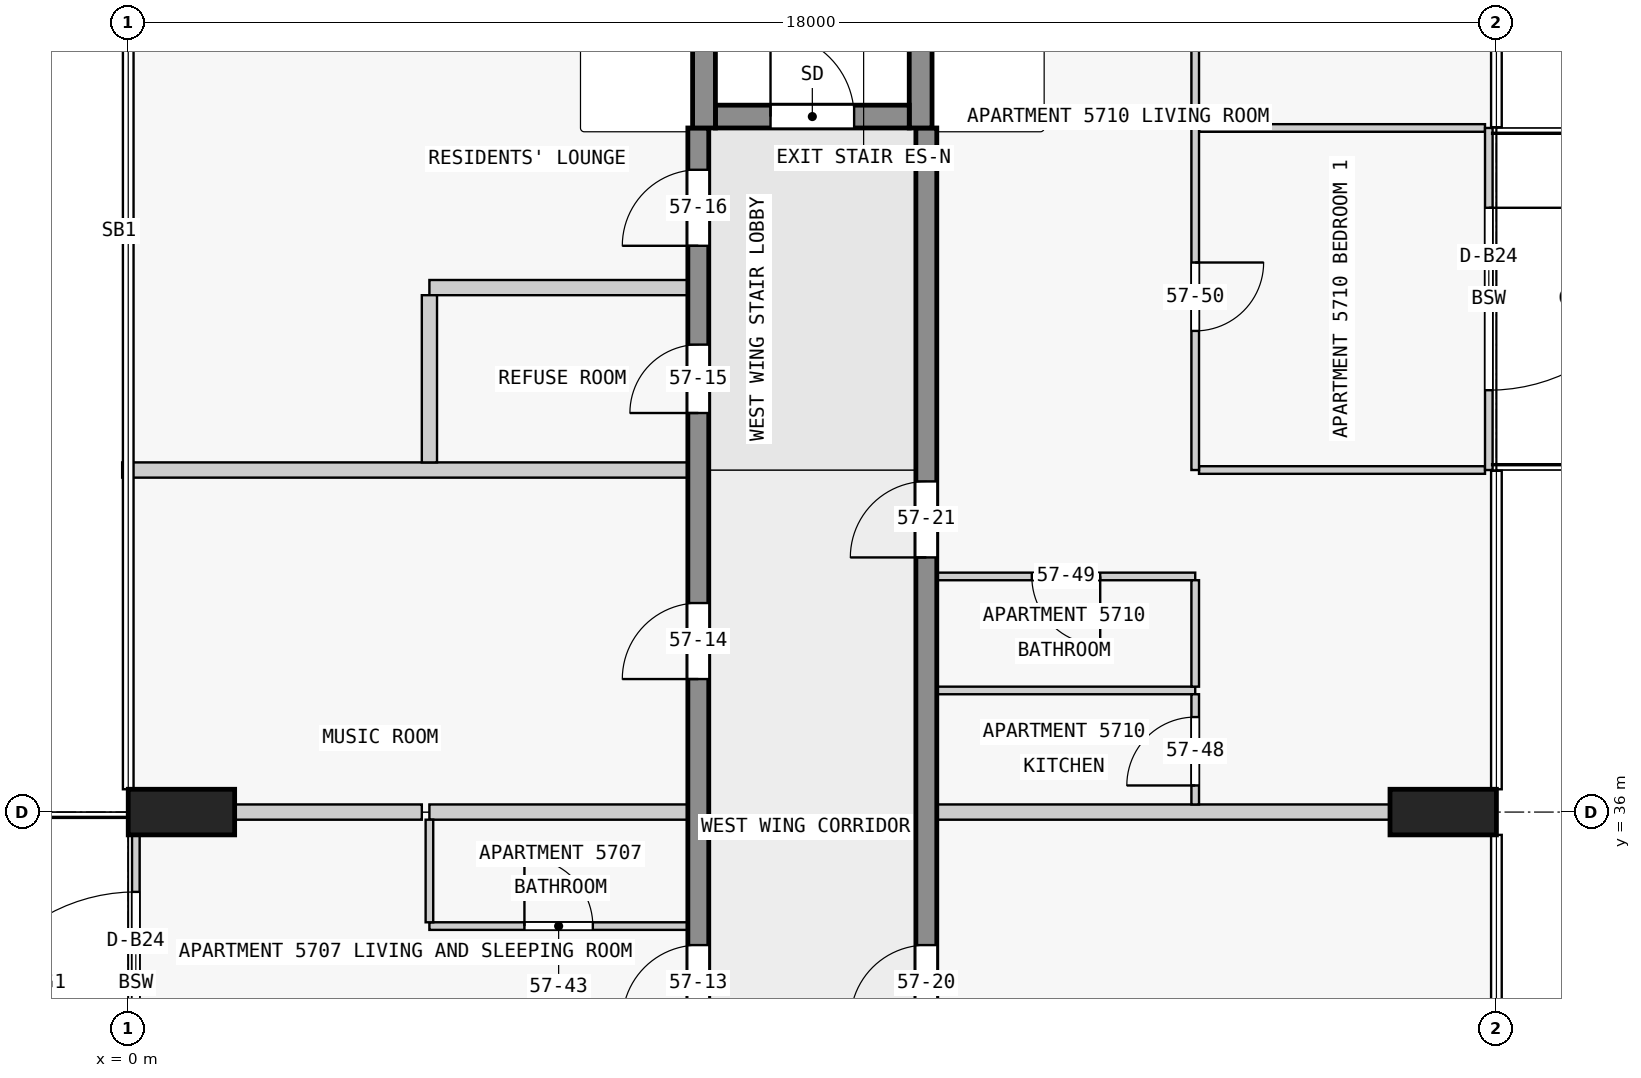
"""IFC4 building model, lengths in metres.
Left out: names, types, materials, properties, quantities, classifications, styles, units other than length and angle.
Written with IfcOpenShell. Run it as: python <this file> out.ifc"""

import sys

from ifc_helpers import new_model, si_unit, direction, frame, frame_2d, origin, origin_2d, place, context, subcontext, project, spatial, rectangle, extrude, element, fill, save


model = new_model("IFC4")
c1 = context("Model", 3, precision=1e-05, world=origin(), true_north=direction((0.0, 1.0)))
c2 = subcontext(c1, "Body", "Model", "MODEL_VIEW")
j1 = project(units=[si_unit("LENGTHUNIT", "METRE"), si_unit("PLANEANGLEUNIT", "RADIAN")], contexts=[c1])
p1 = place(None, origin())
s1 = spatial("IfcSite", under=j1, at=p1, CompositionType="ELEMENT")
p2 = place(p1, origin())
s2 = spatial("IfcBuilding", under=s1, at=p2, CompositionType="ELEMENT")
p3 = place(p2, frame((0.0, 0.0, 218.9)))
s3 = spatial("IfcBuildingStorey", under=s2, at=p3, CompositionType="ELEMENT", Elevation=218.9)
for number, where, z_axis, x_axis in (
    (1, (17.3, 36.0, 0.0), (0.0, 0.0, 1.0), (0.0, 1.0, 0.0)),
    (2, (0.7, 36.0, 0.0), (0.0, 0.0, 1.0), (0.0, 1.0, 0.0)),
):
    element("IfcColumn", number, at=place(p3, frame(where, z_axis=z_axis, x_axis=x_axis)), inside=s3, PredefinedType="COLUMN", context=c2, shape_type="SweptSolid", body=[
        extrude(rectangle(XDim=0.6, YDim=1.4, at=origin_2d()), origin(), (0.0, 0.0, 1.0), 3.5),
    ])
p4 = place(p3, frame((7.725, 45.15, 0.0), z_axis=(0.0, 0.0, 1.0), x_axis=(1.0, 0.0, 0.0)))
e3 = element("IfcWall", 3, at=p4, inside=s3, PredefinedType="SHEAR", context=c2, shape_type="SweptSolid", body=[
    extrude(rectangle(XDim=2.55, YDim=0.3, at=frame_2d((1.275, 0.0))), origin(), (0.0, 0.0, 1.0), 3.5),
])
p5 = place(p4, frame((0.725, 0.0, 0.0)))
e4 = element("IfcOpeningElement", 4, at=p5, cuts=e3, PredefinedType="OPENING", context=c2, shape_type="SweptSolid", body=[
    extrude(rectangle(XDim=1.1, YDim=2.1, at=frame_2d((0.55, 1.05))), frame((0.0, 0.16, 0.0), z_axis=(0.0, -1.0, 0.0), x_axis=(1.0, 0.0, 0.0)), (0.0, 0.0, 1.0), 0.32),
])
for number, where, z_axis, x_axis in (
    (5, (7.575, 45.0, 0.0), (0.0, 0.0, 1.0), (0.0, 1.0, 0.0)),
    (6, (10.425, 45.0, 0.0), (0.0, 0.0, 1.0), (0.0, 1.0, 0.0)),
):
    element("IfcWall", number, at=place(p3, frame(where, z_axis=z_axis, x_axis=x_axis)), inside=s3, PredefinedType="SHEAR", context=c2, shape_type="SweptSolid", body=[
        extrude(rectangle(XDim=7.2, YDim=0.3, at=frame_2d((3.6, 0.0))), origin(), (0.0, 0.0, 1.0), 3.5),
    ])
p6 = place(p3, frame((7.5, 18.0, 0.0), z_axis=(0.0, 0.0, 1.0), x_axis=(0.0, 1.0, 0.0)))
e7 = element("IfcWall", 7, at=p6, inside=s3, PredefinedType="SHEAR", context=c2, shape_type="SweptSolid", body=[
    extrude(rectangle(XDim=27.0, YDim=0.275, at=frame_2d((13.5, 0.0))), origin(), (0.0, 0.0, 1.0), 3.25),
])
p7 = place(p6, frame((1.75, 0.0, 0.0)))
e8 = element("IfcOpeningElement", 8, at=p7, cuts=e7, PredefinedType="OPENING", context=c2, shape_type="SweptSolid", body=[
    extrude(rectangle(XDim=1.0, YDim=2.1, at=frame_2d((0.5, 1.05))), frame((0.0, 0.147, 0.0), z_axis=(0.0, -1.0, 0.0), x_axis=(1.0, 0.0, 0.0)), (0.0, 0.0, 1.0), 0.295),
])
p8 = place(p6, frame((6.25, 0.0, 0.0)))
e9 = element("IfcOpeningElement", 9, at=p8, cuts=e7, PredefinedType="OPENING", context=c2, shape_type="SweptSolid", body=[
    extrude(rectangle(XDim=1.0, YDim=2.1, at=frame_2d((0.5, 1.05))), frame((0.0, 0.147, 0.0), z_axis=(0.0, -1.0, 0.0), x_axis=(1.0, 0.0, 0.0)), (0.0, 0.0, 1.0), 0.295),
])
p9 = place(p6, frame((10.35, 0.0, 0.0)))
e10 = element("IfcOpeningElement", 10, at=p9, cuts=e7, PredefinedType="OPENING", context=c2, shape_type="SweptSolid", body=[
    extrude(rectangle(XDim=1.8, YDim=2.1, at=frame_2d((0.9, 1.05))), frame((0.0, 0.147, 0.0), z_axis=(0.0, -1.0, 0.0), x_axis=(1.0, 0.0, 0.0)), (0.0, 0.0, 1.0), 0.295),
])
p10 = place(p6, frame((15.25, 0.0, 0.0)))
e11 = element("IfcOpeningElement", 11, at=p10, cuts=e7, PredefinedType="OPENING", context=c2, shape_type="SweptSolid", body=[
    extrude(rectangle(XDim=1.0, YDim=2.1, at=frame_2d((0.5, 1.05))), frame((0.0, 0.147, 0.0), z_axis=(0.0, -1.0, 0.0), x_axis=(1.0, 0.0, 0.0)), (0.0, 0.0, 1.0), 0.295),
])
p11 = place(p6, frame((19.75, 0.0, 0.0)))
e12 = element("IfcOpeningElement", 12, at=p11, cuts=e7, PredefinedType="OPENING", context=c2, shape_type="SweptSolid", body=[
    extrude(rectangle(XDim=1.0, YDim=2.1, at=frame_2d((0.5, 1.05))), frame((0.0, 0.147, 0.0), z_axis=(0.0, -1.0, 0.0), x_axis=(1.0, 0.0, 0.0)), (0.0, 0.0, 1.0), 0.295),
])
p12 = place(p6, frame((23.25, 0.0, 0.0)))
e13 = element("IfcOpeningElement", 13, at=p12, cuts=e7, PredefinedType="OPENING", context=c2, shape_type="SweptSolid", body=[
    extrude(rectangle(XDim=0.9, YDim=2.1, at=frame_2d((0.45, 1.05))), frame((0.0, 0.147, 0.0), z_axis=(0.0, -1.0, 0.0), x_axis=(1.0, 0.0, 0.0)), (0.0, 0.0, 1.0), 0.295),
])
p13 = place(p6, frame((25.45, 0.0, 0.0)))
e14 = element("IfcOpeningElement", 14, at=p13, cuts=e7, PredefinedType="OPENING", context=c2, shape_type="SweptSolid", body=[
    extrude(rectangle(XDim=1.0, YDim=2.1, at=frame_2d((0.5, 1.05))), frame((0.0, 0.147, 0.0), z_axis=(0.0, -1.0, 0.0), x_axis=(1.0, 0.0, 0.0)), (0.0, 0.0, 1.0), 0.295),
])
p14 = place(p3, frame((10.5, 18.0, 0.0), z_axis=(0.0, 0.0, 1.0), x_axis=(0.0, 1.0, 0.0)))
e15 = element("IfcWall", 15, at=p14, inside=s3, PredefinedType="SHEAR", context=c2, shape_type="SweptSolid", body=[
    extrude(rectangle(XDim=27.0, YDim=0.275, at=frame_2d((13.5, 0.0))), origin(), (0.0, 0.0, 1.0), 3.25),
])
p15 = place(p14, frame((1.75, 0.0, 0.0)))
e16 = element("IfcOpeningElement", 16, at=p15, cuts=e15, PredefinedType="OPENING", context=c2, shape_type="SweptSolid", body=[
    extrude(rectangle(XDim=1.0, YDim=2.1, at=frame_2d((0.5, 1.05))), frame((0.0, 0.147, 0.0), z_axis=(0.0, -1.0, 0.0), x_axis=(1.0, 0.0, 0.0)), (0.0, 0.0, 1.0), 0.295),
])
p16 = place(p14, frame((6.25, 0.0, 0.0)))
e17 = element("IfcOpeningElement", 17, at=p16, cuts=e15, PredefinedType="OPENING", context=c2, shape_type="SweptSolid", body=[
    extrude(rectangle(XDim=1.0, YDim=2.1, at=frame_2d((0.5, 1.05))), frame((0.0, 0.147, 0.0), z_axis=(0.0, -1.0, 0.0), x_axis=(1.0, 0.0, 0.0)), (0.0, 0.0, 1.0), 0.295),
])
p17 = place(p14, frame((10.75, 0.0, 0.0)))
e18 = element("IfcOpeningElement", 18, at=p17, cuts=e15, PredefinedType="OPENING", context=c2, shape_type="SweptSolid", body=[
    extrude(rectangle(XDim=1.0, YDim=2.1, at=frame_2d((0.5, 1.05))), frame((0.0, 0.147, 0.0), z_axis=(0.0, -1.0, 0.0), x_axis=(1.0, 0.0, 0.0)), (0.0, 0.0, 1.0), 0.295),
])
p18 = place(p14, frame((15.25, 0.0, 0.0)))
e19 = element("IfcOpeningElement", 19, at=p18, cuts=e15, PredefinedType="OPENING", context=c2, shape_type="SweptSolid", body=[
    extrude(rectangle(XDim=1.0, YDim=2.1, at=frame_2d((0.5, 1.05))), frame((0.0, 0.147, 0.0), z_axis=(0.0, -1.0, 0.0), x_axis=(1.0, 0.0, 0.0)), (0.0, 0.0, 1.0), 0.295),
])
p19 = place(p14, frame((21.35, 0.0, 0.0)))
e20 = element("IfcOpeningElement", 20, at=p19, cuts=e15, PredefinedType="OPENING", context=c2, shape_type="SweptSolid", body=[
    extrude(rectangle(XDim=1.0, YDim=2.1, at=frame_2d((0.5, 1.05))), frame((0.0, 0.147, 0.0), z_axis=(0.0, -1.0, 0.0), x_axis=(1.0, 0.0, 0.0)), (0.0, 0.0, 1.0), 0.295),
])
p20 = place(p3, frame((0.1, 31.5, 0.0), z_axis=(0.0, 0.0, 1.0), x_axis=(0.0, 1.0, 0.0)))
e21 = element("IfcWall", 21, at=p20, inside=s3, PredefinedType="STANDARD", context=c2, shape_type="SweptSolid", body=[
    extrude(rectangle(XDim=4.5, YDim=0.1, at=frame_2d((2.25, 0.0))), origin(), (0.0, 0.0, 1.0), 3.25),
])
p21 = place(p20, frame((1.05, 0.0, 0.0)))
e22 = element("IfcOpeningElement", 22, at=p21, cuts=e21, PredefinedType="OPENING", context=c2, shape_type="SweptSolid", body=[
    extrude(rectangle(XDim=2.4, YDim=2.4, at=frame_2d((1.2, 1.2))), frame((0.0, 0.06, 0.0), z_axis=(0.0, -1.0, 0.0), x_axis=(1.0, 0.0, 0.0)), (0.0, 0.0, 1.0), 0.12),
])
p22 = place(p3, frame((17.9, 45.0, 0.0), z_axis=(0.0, 0.0, 1.0), x_axis=(0.0, -1.0, 0.0)))
e23 = element("IfcWall", 23, at=p22, inside=s3, PredefinedType="STANDARD", context=c2, shape_type="SweptSolid", body=[
    extrude(rectangle(XDim=4.5, YDim=0.1, at=frame_2d((2.25, 0.0))), origin(), (0.0, 0.0, 1.0), 3.25),
])
p23 = place(p22, frame((1.05, 0.0, 0.0)))
e24 = element("IfcOpeningElement", 24, at=p23, cuts=e23, PredefinedType="OPENING", context=c2, shape_type="SweptSolid", body=[
    extrude(rectangle(XDim=2.4, YDim=2.4, at=frame_2d((1.2, 1.2))), frame((0.0, 0.06, 0.0), z_axis=(0.0, -1.0, 0.0), x_axis=(1.0, 0.0, 0.0)), (0.0, 0.0, 1.0), 0.12),
])
p24 = place(p3, frame((3.962, 34.5, 0.0), z_axis=(0.0, 0.0, 1.0), x_axis=(1.0, 0.0, 0.0)))
e25 = element("IfcWall", 25, at=p24, inside=s3, PredefinedType="PARTITIONING", context=c2, shape_type="SweptSolid", body=[
    extrude(rectangle(XDim=3.4, YDim=0.1, at=frame_2d((1.7, 0.0))), origin(), (0.0, 0.0, 1.0), 3.25),
])
p25 = place(p24, frame((1.25, 0.0, 0.0)))
e26 = element("IfcOpeningElement", 26, at=p25, cuts=e25, PredefinedType="OPENING", context=c2, shape_type="SweptSolid", body=[
    extrude(rectangle(XDim=0.9, YDim=2.1, at=frame_2d((0.45, 1.05))), frame((0.0, 0.06, 0.0), z_axis=(0.0, -1.0, 0.0), x_axis=(1.0, 0.0, 0.0)), (0.0, 0.0, 1.0), 0.12),
])
p26 = place(p3, frame((7.363, 36.0, 0.0), z_axis=(0.0, 0.0, 1.0), x_axis=(-1.0, 0.0, 0.0)))
e27 = element("IfcWall", 27, at=p26, inside=s3, PredefinedType="PARTITIONING", context=c2, shape_type="SweptSolid", body=[
    extrude(rectangle(XDim=3.4, YDim=0.2, at=frame_2d((1.7, 0.0))), origin(), (0.0, 0.0, 1.0), 3.25),
])
p27 = place(p3, frame((16.6, 36.0, 0.0), z_axis=(0.0, 0.0, 1.0), x_axis=(-1.0, 0.0, 0.0)))
e28 = element("IfcWall", 28, at=p27, inside=s3, PredefinedType="PARTITIONING", context=c2, shape_type="SweptSolid", body=[
    extrude(rectangle(XDim=5.963, YDim=0.2, at=frame_2d((2.981, 0.0))), origin(), (0.0, 0.0, 1.0), 3.25),
])
p28 = place(p3, frame((1.4, 36.0, 0.0), z_axis=(0.0, 0.0, 1.0), x_axis=(1.0, 0.0, 0.0)))
e29 = element("IfcWall", 29, at=p28, inside=s3, PredefinedType="PARTITIONING", context=c2, shape_type="SweptSolid", body=[
    extrude(rectangle(XDim=2.463, YDim=0.2, at=frame_2d((1.231, 0.0))), origin(), (0.0, 0.0, 1.0), 3.25),
])
p29 = place(p3, frame((14.038, 37.6, 0.0), z_axis=(0.0, 0.0, 1.0), x_axis=(-1.0, 0.0, 0.0)))
e30 = element("IfcWall", 30, at=p29, inside=s3, PredefinedType="PARTITIONING", context=c2, shape_type="SweptSolid", body=[
    extrude(rectangle(XDim=3.4, YDim=0.1, at=frame_2d((1.7, 0.0))), origin(), (0.0, 0.0, 1.0), 3.25),
])
p30 = place(p3, frame((14.038, 39.1, 0.0), z_axis=(0.0, 0.0, 1.0), x_axis=(-1.0, 0.0, 0.0)))
e31 = element("IfcWall", 31, at=p30, inside=s3, PredefinedType="PARTITIONING", context=c2, shape_type="SweptSolid", body=[
    extrude(rectangle(XDim=3.4, YDim=0.1, at=frame_2d((1.7, 0.0))), origin(), (0.0, 0.0, 1.0), 3.25),
])
p31 = place(p30, frame((1.25, 0.0, 0.0)))
e32 = element("IfcOpeningElement", 32, at=p31, cuts=e31, PredefinedType="OPENING", context=c2, shape_type="SweptSolid", body=[
    extrude(rectangle(XDim=0.9, YDim=2.1, at=frame_2d((0.45, 1.05))), frame((0.0, 0.06, 0.0), z_axis=(0.0, -1.0, 0.0), x_axis=(1.0, 0.0, 0.0)), (0.0, 0.0, 1.0), 0.12),
])
p32 = place(p3, frame((14.087, 40.5, 0.0), z_axis=(0.0, 0.0, 1.0), x_axis=(1.0, 0.0, 0.0)))
e33 = element("IfcWall", 33, at=p32, inside=s3, PredefinedType="PARTITIONING", context=c2, shape_type="SweptSolid", body=[
    extrude(rectangle(XDim=3.763, YDim=0.1, at=frame_2d((1.881, 0.0))), origin(), (0.0, 0.0, 1.0), 3.25),
])
p33 = place(p3, frame((7.363, 40.5, 0.0), z_axis=(0.0, 0.0, 1.0), x_axis=(-1.0, 0.0, 0.0)))
e34 = element("IfcWall", 34, at=p33, inside=s3, PredefinedType="PARTITIONING", context=c2, shape_type="SweptSolid", body=[
    extrude(rectangle(XDim=7.443, YDim=0.2, at=frame_2d((3.721, 0.0))), origin(), (0.0, 0.0, 1.0), 3.25),
])
p34 = place(p3, frame((7.363, 42.9, 0.0), z_axis=(0.0, 0.0, 1.0), x_axis=(-1.0, 0.0, 0.0)))
e35 = element("IfcWall", 35, at=p34, inside=s3, PredefinedType="PARTITIONING", context=c2, shape_type="SweptSolid", body=[
    extrude(rectangle(XDim=3.4, YDim=0.2, at=frame_2d((1.7, 0.0))), origin(), (0.0, 0.0, 1.0), 3.25),
])
p35 = place(p3, frame((17.85, 45.0, 0.0), z_axis=(0.0, 0.0, 1.0), x_axis=(-1.0, 0.0, 0.0)))
e36 = element("IfcWall", 36, at=p35, inside=s3, PredefinedType="PARTITIONING", context=c2, shape_type="SweptSolid", body=[
    extrude(rectangle(XDim=3.763, YDim=0.1, at=frame_2d((1.881, 0.0))), origin(), (0.0, 0.0, 1.0), 3.25),
])
p36 = place(p3, frame((3.962, 35.9, 0.0), z_axis=(0.0, 0.0, 1.0), x_axis=(0.0, -1.0, 0.0)))
e37 = element("IfcWall", 37, at=p36, inside=s3, PredefinedType="PARTITIONING", context=c2, shape_type="SweptSolid", body=[
    extrude(rectangle(XDim=1.35, YDim=0.1, at=frame_2d((0.675, 0.0))), origin(), (0.0, 0.0, 1.0), 3.25),
])
p37 = place(p3, frame((3.962, 42.8, 0.0), z_axis=(0.0, 0.0, 1.0), x_axis=(0.0, -1.0, 0.0)))
e38 = element("IfcWall", 38, at=p37, inside=s3, PredefinedType="PARTITIONING", context=c2, shape_type="SweptSolid", body=[
    extrude(rectangle(XDim=2.2, YDim=0.2, at=frame_2d((1.1, 0.0))), origin(), (0.0, 0.0, 1.0), 3.25),
])
p38 = place(p3, frame((14.038, 54.08, 0.0), z_axis=(0.0, 0.0, 1.0), x_axis=(0.0, -1.0, 0.0)))
e39 = element("IfcWall", 39, at=p38, inside=s3, PredefinedType="PARTITIONING", context=c2, shape_type="SweptSolid", body=[
    extrude(rectangle(XDim=13.58, YDim=0.1, at=frame_2d((6.79, 0.0))), origin(), (0.0, 0.0, 1.0), 3.25),
])
p39 = place(p38, frame((10.85, 0.0, 0.0)))
e40 = element("IfcOpeningElement", 40, at=p39, cuts=e39, PredefinedType="OPENING", context=c2, shape_type="SweptSolid", body=[
    extrude(rectangle(XDim=0.9, YDim=2.1, at=frame_2d((0.45, 1.05))), frame((0.0, 0.06, 0.0), z_axis=(0.0, -1.0, 0.0), x_axis=(1.0, 0.0, 0.0)), (0.0, 0.0, 1.0), 0.12),
])
p40 = place(p38, frame((6.45, 0.0, 0.0)))
e41 = element("IfcOpeningElement", 41, at=p40, cuts=e39, PredefinedType="OPENING", context=c2, shape_type="SweptSolid", body=[
    extrude(rectangle(XDim=0.9, YDim=2.1, at=frame_2d((0.45, 1.05))), frame((0.0, 0.06, 0.0), z_axis=(0.0, -1.0, 0.0), x_axis=(1.0, 0.0, 0.0)), (0.0, 0.0, 1.0), 0.12),
])
p41 = place(p38, frame((1.95, 0.0, 0.0)))
e42 = element("IfcOpeningElement", 42, at=p41, cuts=e39, PredefinedType="OPENING", context=c2, shape_type="SweptSolid", body=[
    extrude(rectangle(XDim=0.9, YDim=2.1, at=frame_2d((0.45, 1.05))), frame((0.0, 0.06, 0.0), z_axis=(0.0, -1.0, 0.0), x_axis=(1.0, 0.0, 0.0)), (0.0, 0.0, 1.0), 0.12),
])
p42 = place(p3, frame((14.038, 36.1, 0.0), z_axis=(0.0, 0.0, 1.0), x_axis=(0.0, 1.0, 0.0)))
e43 = element("IfcWall", 43, at=p42, inside=s3, PredefinedType="PARTITIONING", context=c2, shape_type="SweptSolid", body=[
    extrude(rectangle(XDim=1.45, YDim=0.1, at=frame_2d((0.725, 0.0))), origin(), (0.0, 0.0, 1.0), 3.25),
])
p43 = place(p42, frame((0.25, 0.0, 0.0)))
e44 = element("IfcOpeningElement", 44, at=p43, cuts=e43, PredefinedType="OPENING", context=c2, shape_type="SweptSolid", body=[
    extrude(rectangle(XDim=0.9, YDim=2.1, at=frame_2d((0.45, 1.05))), frame((0.0, 0.06, 0.0), z_axis=(0.0, -1.0, 0.0), x_axis=(1.0, 0.0, 0.0)), (0.0, 0.0, 1.0), 0.12),
])
p44 = place(p3, frame((14.038, 37.65, 0.0), z_axis=(0.0, 0.0, 1.0), x_axis=(0.0, 1.0, 0.0)))
e45 = element("IfcWall", 45, at=p44, inside=s3, PredefinedType="PARTITIONING", context=c2, shape_type="SweptSolid", body=[
    extrude(rectangle(XDim=1.4, YDim=0.1, at=frame_2d((0.7, 0.0))), origin(), (0.0, 0.0, 1.0), 3.25),
])
p45 = place(p21, origin())
e46 = element("IfcDoor", 46, at=p45, inside=s3, OperationType="SINGLE_SWING_LEFT", PredefinedType="DOOR", context=c2, shape_type="SweptSolid", body=[
    extrude(rectangle(XDim=2.4, YDim=2.4, at=frame_2d((1.2, 1.2))), frame((0.0, 0.025, 0.0), z_axis=(0.0, -1.0, 0.0), x_axis=(1.0, 0.0, 0.0)), (0.0, 0.0, 1.0), 0.05),
])
fill(e22, e46)
p46 = place(p23, origin())
e47 = element("IfcDoor", 47, at=p46, inside=s3, OperationType="SINGLE_SWING_LEFT", PredefinedType="DOOR", context=c2, shape_type="SweptSolid", body=[
    extrude(rectangle(XDim=2.4, YDim=2.4, at=frame_2d((1.2, 1.2))), frame((0.0, 0.025, 0.0), z_axis=(0.0, -1.0, 0.0), x_axis=(1.0, 0.0, 0.0)), (0.0, 0.0, 1.0), 0.05),
])
fill(e24, e47)
p47 = place(p5, origin())
e48 = element("IfcDoor", 48, at=p47, inside=s3, OperationType="SINGLE_SWING_LEFT", PredefinedType="DOOR", context=c2, shape_type="SweptSolid", body=[
    extrude(rectangle(XDim=1.1, YDim=2.1, at=frame_2d((0.55, 1.05))), frame((0.0, 0.025, 0.0), z_axis=(0.0, -1.0, 0.0), x_axis=(1.0, 0.0, 0.0)), (0.0, 0.0, 1.0), 0.05),
])
fill(e4, e48)
p48 = place(p10, origin())
e49 = element("IfcDoor", 49, at=p48, inside=s3, OperationType="SINGLE_SWING_RIGHT", PredefinedType="DOOR", context=c2, shape_type="SweptSolid", body=[
    extrude(rectangle(XDim=1.0, YDim=2.1, at=frame_2d((0.5, 1.05))), frame((0.0, 0.025, 0.0), z_axis=(0.0, -1.0, 0.0), x_axis=(1.0, 0.0, 0.0)), (0.0, 0.0, 1.0), 0.05),
])
fill(e11, e49)
p49 = place(p11, origin())
e50 = element("IfcDoor", 50, at=p49, inside=s3, OperationType="SINGLE_SWING_RIGHT", PredefinedType="DOOR", context=c2, shape_type="SweptSolid", body=[
    extrude(rectangle(XDim=1.0, YDim=2.1, at=frame_2d((0.5, 1.05))), frame((0.0, 0.025, 0.0), z_axis=(0.0, -1.0, 0.0), x_axis=(1.0, 0.0, 0.0)), (0.0, 0.0, 1.0), 0.05),
])
fill(e12, e50)
p50 = place(p12, origin())
e51 = element("IfcDoor", 51, at=p50, inside=s3, OperationType="SINGLE_SWING_RIGHT", PredefinedType="DOOR", context=c2, shape_type="SweptSolid", body=[
    extrude(rectangle(XDim=0.9, YDim=2.1, at=frame_2d((0.45, 1.05))), frame((0.0, 0.025, 0.0), z_axis=(0.0, -1.0, 0.0), x_axis=(1.0, 0.0, 0.0)), (0.0, 0.0, 1.0), 0.05),
])
fill(e13, e51)
p51 = place(p13, origin())
e52 = element("IfcDoor", 52, at=p51, inside=s3, OperationType="SINGLE_SWING_RIGHT", PredefinedType="DOOR", context=c2, shape_type="SweptSolid", body=[
    extrude(rectangle(XDim=1.0, YDim=2.1, at=frame_2d((0.5, 1.05))), frame((0.0, 0.025, 0.0), z_axis=(0.0, -1.0, 0.0), x_axis=(1.0, 0.0, 0.0)), (0.0, 0.0, 1.0), 0.05),
])
fill(e14, e52)
p52 = place(p18, origin())
e53 = element("IfcDoor", 53, at=p52, inside=s3, OperationType="SINGLE_SWING_RIGHT", PredefinedType="DOOR", context=c2, shape_type="SweptSolid", body=[
    extrude(rectangle(XDim=1.0, YDim=2.1, at=frame_2d((0.5, 1.05))), frame((0.0, 0.025, 0.0), z_axis=(0.0, -1.0, 0.0), x_axis=(1.0, 0.0, 0.0)), (0.0, 0.0, 1.0), 0.05),
])
fill(e19, e53)
p53 = place(p19, origin())
e54 = element("IfcDoor", 54, at=p53, inside=s3, OperationType="SINGLE_SWING_RIGHT", PredefinedType="DOOR", context=c2, shape_type="SweptSolid", body=[
    extrude(rectangle(XDim=1.0, YDim=2.1, at=frame_2d((0.5, 1.05))), frame((0.0, 0.025, 0.0), z_axis=(0.0, -1.0, 0.0), x_axis=(1.0, 0.0, 0.0)), (0.0, 0.0, 1.0), 0.05),
])
fill(e20, e54)
p54 = place(p25, origin())
e55 = element("IfcDoor", 55, at=p54, inside=s3, OperationType="SINGLE_SWING_LEFT", PredefinedType="DOOR", context=c2, shape_type="SweptSolid", body=[
    extrude(rectangle(XDim=0.9, YDim=2.1, at=frame_2d((0.45, 1.05))), frame((0.0, 0.025, 0.0), z_axis=(0.0, -1.0, 0.0), x_axis=(1.0, 0.0, 0.0)), (0.0, 0.0, 1.0), 0.05),
])
fill(e26, e55)
p55 = place(p43, origin())
e56 = element("IfcDoor", 56, at=p55, inside=s3, OperationType="SINGLE_SWING_LEFT", PredefinedType="DOOR", context=c2, shape_type="SweptSolid", body=[
    extrude(rectangle(XDim=0.9, YDim=2.1, at=frame_2d((0.45, 1.05))), frame((0.0, 0.025, 0.0), z_axis=(0.0, -1.0, 0.0), x_axis=(1.0, 0.0, 0.0)), (0.0, 0.0, 1.0), 0.05),
])
fill(e44, e56)
p56 = place(p31, origin())
e57 = element("IfcDoor", 57, at=p56, inside=s3, OperationType="SINGLE_SWING_LEFT", PredefinedType="DOOR", context=c2, shape_type="SweptSolid", body=[
    extrude(rectangle(XDim=0.9, YDim=2.1, at=frame_2d((0.45, 1.05))), frame((0.0, 0.025, 0.0), z_axis=(0.0, -1.0, 0.0), x_axis=(1.0, 0.0, 0.0)), (0.0, 0.0, 1.0), 0.05),
])
fill(e32, e57)
p57 = place(p39, origin())
e58 = element("IfcDoor", 58, at=p57, inside=s3, OperationType="SINGLE_SWING_RIGHT", PredefinedType="DOOR", context=c2, shape_type="SweptSolid", body=[
    extrude(rectangle(XDim=0.9, YDim=2.1, at=frame_2d((0.45, 1.05))), frame((0.0, 0.025, 0.0), z_axis=(0.0, -1.0, 0.0), x_axis=(1.0, 0.0, 0.0)), (0.0, 0.0, 1.0), 0.05),
])
fill(e40, e58)
save(model, sys.argv[1])
